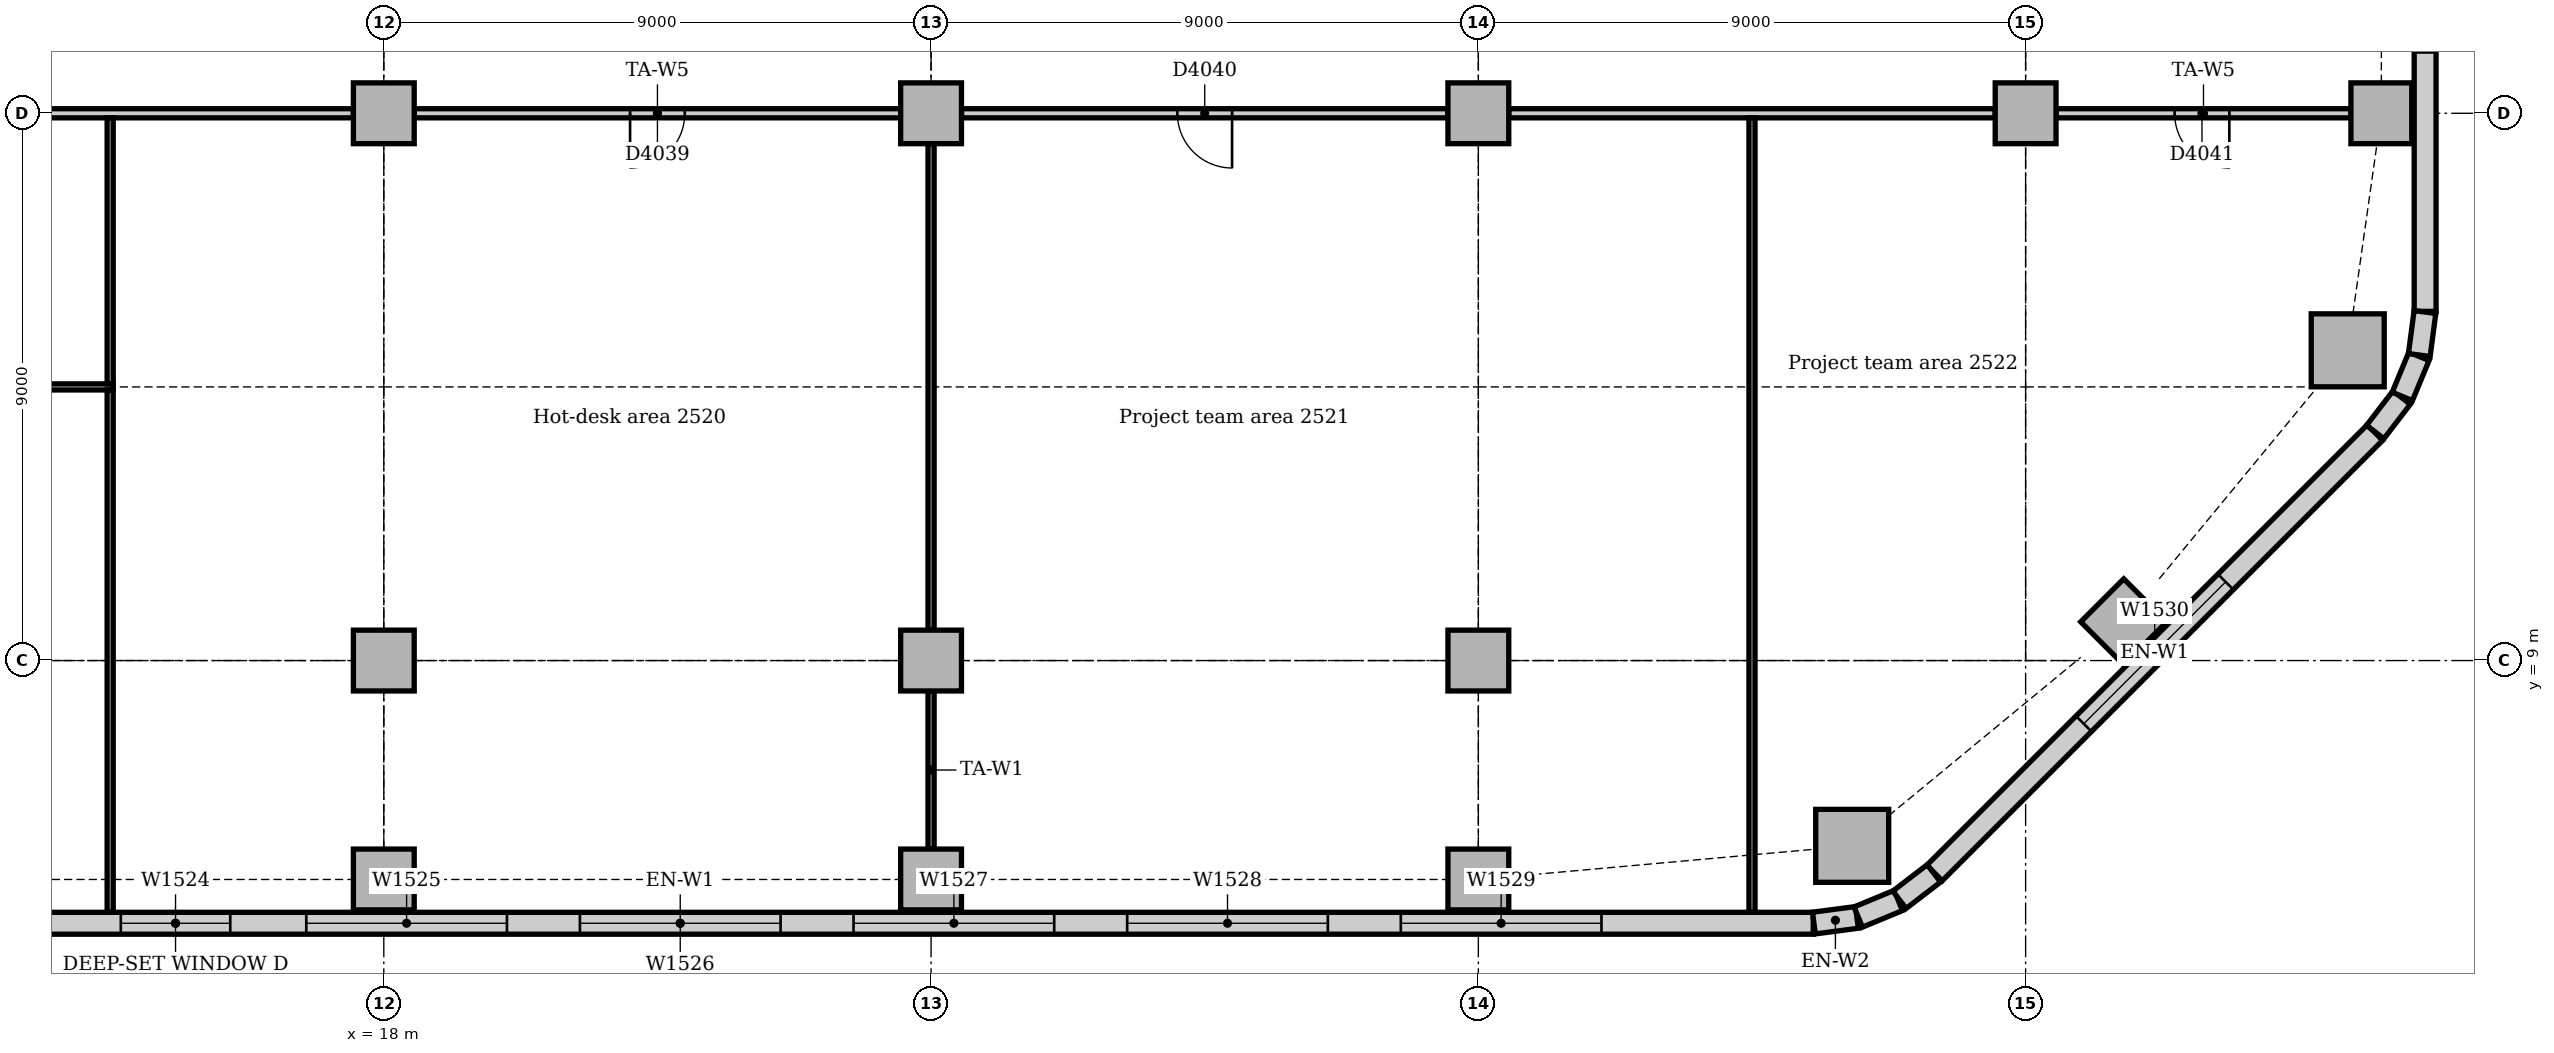
"""IFC4 building model, lengths in metres.
Left out: names, types, materials, properties, quantities, classifications, styles, units other than length and angle.
Written with IfcOpenShell. Run it as: python <this file> out.ifc"""

import sys

from ifc_helpers import new_model, si_unit, direction, frame, frame_2d, origin, origin_2d, place, context, subcontext, project, spatial, rectangle, extrude, element, fill, save


model = new_model("IFC4")
c1 = context("Model", 3, precision=1e-05, world=origin(), true_north=direction((0.0, 1.0)))
c2 = subcontext(c1, "Body", "Model", "MODEL_VIEW")
j1 = project(units=[si_unit("LENGTHUNIT", "METRE"), si_unit("PLANEANGLEUNIT", "RADIAN")], contexts=[c1])
p1 = place(None, origin())
s1 = spatial("IfcSite", under=j1, at=p1, CompositionType="ELEMENT")
p2 = place(p1, origin())
s2 = spatial("IfcBuilding", under=s1, at=p2, CompositionType="ELEMENT")
p3 = place(p2, frame((0.0, 0.0, 108.0)))
s3 = spatial("IfcBuildingStorey", under=s2, at=p3, CompositionType="ELEMENT", Elevation=108.0)
for number, where, z_axis, x_axis in (
    (1, (42.148, 5.953, 0.0), (0.0, 0.0, 1.0), (1.0, 0.0, 0.0)),
    (2, (50.297, 14.102, 0.0), (0.0, 0.0, 1.0), (1.0, 0.0, 0.0)),
):
    element("IfcColumn", number, at=place(p3, frame(where, z_axis=z_axis, x_axis=x_axis)), inside=s3, PredefinedType="COLUMN", context=c2, shape_type="SweptSolid", body=[
        extrude(rectangle(XDim=1.2, YDim=1.2, at=origin_2d()), origin(), (0.0, 0.0, 1.0), 3.85),
    ])
for number, where, z_axis, x_axis in (
    (3, (18.0, 5.4, 0.0), (0.0, 0.0, 1.0), (1.0, 0.0, 0.0)),
    (4, (27.0, 5.4, 0.0), (0.0, 0.0, 1.0), (1.0, 0.0, 0.0)),
    (5, (36.0, 5.4, 0.0), (0.0, 0.0, 1.0), (1.0, 0.0, 0.0)),
    (6, (46.614, 9.636, 0.0), (0.0, 0.0, 1.0), (0.707, 0.707, 0.0)),
    (7, (50.85, 18.0, 0.0), (0.0, 0.0, 1.0), (1.0, 0.0, 0.0)),
    (8, (18.0, 9.0, 0.0), (0.0, 0.0, 1.0), (1.0, 0.0, 0.0)),
    (9, (18.0, 18.0, 0.0), (0.0, 0.0, 1.0), (1.0, 0.0, 0.0)),
    (10, (27.0, 9.0, 0.0), (0.0, 0.0, 1.0), (1.0, 0.0, 0.0)),
    (11, (27.0, 18.0, 0.0), (0.0, 0.0, 1.0), (1.0, 0.0, 0.0)),
    (12, (36.0, 9.0, 0.0), (0.0, 0.0, 1.0), (1.0, 0.0, 0.0)),
    (13, (36.0, 18.0, 0.0), (0.0, 0.0, 1.0), (1.0, 0.0, 0.0)),
    (14, (45.0, 18.0, 0.0), (0.0, 0.0, 1.0), (1.0, 0.0, 0.0)),
):
    element("IfcColumn", number, at=place(p3, frame(where, z_axis=z_axis, x_axis=x_axis)), inside=s3, PredefinedType="COLUMN", context=c2, shape_type="SweptSolid", body=[
        extrude(rectangle(XDim=1.0, YDim=1.0, at=origin_2d()), origin(), (0.0, 0.0, 1.0), 3.85),
    ])
p4 = place(p3, frame((4.243, 4.68, 0.0), z_axis=(0.0, 0.0, 1.0), x_axis=(1.0, 0.0, 0.0)))
e15 = element("IfcWall", 15, at=p4, inside=s3, PredefinedType="STANDARD", context=c2, shape_type="SweptSolid", body=[
    extrude(rectangle(XDim=37.265, YDim=0.36, at=frame_2d((18.632, 0.0))), origin(), (0.0, 0.0, 1.0), 3.85),
])
p5 = place(p4, frame((3.482, 0.0, 0.9)))
e16 = element("IfcOpeningElement", 16, at=p5, cuts=e15, PredefinedType="OPENING", context=c2, shape_type="SweptSolid", body=[
    extrude(rectangle(XDim=3.3, YDim=1.6, at=frame_2d((1.65, 0.8))), frame((0.0, 0.19, 0.0), z_axis=(0.0, -1.0, 0.0), x_axis=(1.0, 0.0, 0.0)), (0.0, 0.0, 1.0), 0.38),
])
p6 = place(p4, frame((9.432, 0.0, 0.9)))
e17 = element("IfcOpeningElement", 17, at=p6, cuts=e15, PredefinedType="OPENING", context=c2, shape_type="SweptSolid", body=[
    extrude(rectangle(XDim=1.8, YDim=1.6, at=frame_2d((0.9, 0.8))), frame((0.0, 0.19, 0.0), z_axis=(0.0, -1.0, 0.0), x_axis=(1.0, 0.0, 0.0)), (0.0, 0.0, 1.0), 0.38),
])
p7 = place(p4, frame((12.482, 0.0, 0.9)))
e18 = element("IfcOpeningElement", 18, at=p7, cuts=e15, PredefinedType="OPENING", context=c2, shape_type="SweptSolid", body=[
    extrude(rectangle(XDim=3.3, YDim=1.6, at=frame_2d((1.65, 0.8))), frame((0.0, 0.19, 0.0), z_axis=(0.0, -1.0, 0.0), x_axis=(1.0, 0.0, 0.0)), (0.0, 0.0, 1.0), 0.38),
])
p8 = place(p4, frame((16.982, 0.0, 0.9)))
e19 = element("IfcOpeningElement", 19, at=p8, cuts=e15, PredefinedType="OPENING", context=c2, shape_type="SweptSolid", body=[
    extrude(rectangle(XDim=3.3, YDim=1.6, at=frame_2d((1.65, 0.8))), frame((0.0, 0.19, 0.0), z_axis=(0.0, -1.0, 0.0), x_axis=(1.0, 0.0, 0.0)), (0.0, 0.0, 1.0), 0.38),
])
p9 = place(p4, frame((21.482, 0.0, 0.9)))
e20 = element("IfcOpeningElement", 20, at=p9, cuts=e15, PredefinedType="OPENING", context=c2, shape_type="SweptSolid", body=[
    extrude(rectangle(XDim=3.3, YDim=1.6, at=frame_2d((1.65, 0.8))), frame((0.0, 0.19, 0.0), z_axis=(0.0, -1.0, 0.0), x_axis=(1.0, 0.0, 0.0)), (0.0, 0.0, 1.0), 0.38),
])
p10 = place(p4, frame((25.982, 0.0, 0.9)))
e21 = element("IfcOpeningElement", 21, at=p10, cuts=e15, PredefinedType="OPENING", context=c2, shape_type="SweptSolid", body=[
    extrude(rectangle(XDim=3.3, YDim=1.6, at=frame_2d((1.65, 0.8))), frame((0.0, 0.19, 0.0), z_axis=(0.0, -1.0, 0.0), x_axis=(1.0, 0.0, 0.0)), (0.0, 0.0, 1.0), 0.38),
])
p11 = place(p4, frame((30.482, 0.0, 0.9)))
e22 = element("IfcOpeningElement", 22, at=p11, cuts=e15, PredefinedType="OPENING", context=c2, shape_type="SweptSolid", body=[
    extrude(rectangle(XDim=3.3, YDim=1.6, at=frame_2d((1.65, 0.8))), frame((0.0, 0.19, 0.0), z_axis=(0.0, -1.0, 0.0), x_axis=(1.0, 0.0, 0.0)), (0.0, 0.0, 1.0), 0.38),
])
p12 = place(p3, frame((43.501, 5.506, 0.0), z_axis=(0.0, 0.0, 1.0), x_axis=(0.707106781187, 0.707106781187, 0.0)))
e23 = element("IfcWall", 23, at=p12, inside=s3, PredefinedType="STANDARD", context=c2, shape_type="SweptSolid", body=[
    extrude(rectangle(XDim=10.243, YDim=0.36, at=frame_2d((5.121, 0.0))), origin(), (0.0, 0.0, 1.0), 3.85),
])
p13 = place(p12, frame((3.471, 0.0, 0.9)))
e24 = element("IfcOpeningElement", 24, at=p13, cuts=e23, PredefinedType="OPENING", context=c2, shape_type="SweptSolid", body=[
    extrude(rectangle(XDim=3.3, YDim=1.6, at=frame_2d((1.65, 0.8))), frame((0.0, 0.19, 0.0), z_axis=(0.0, -1.0, 0.0), x_axis=(1.0, 0.0, 0.0)), (0.0, 0.0, 1.0), 0.38),
])
p14 = place(p3, frame((51.57, 14.743, 0.0), z_axis=(0.0, 0.0, 1.0), x_axis=(0.0, 1.0, 0.0)))
e25 = element("IfcWall", 25, at=p14, inside=s3, PredefinedType="STANDARD", context=c2, shape_type="SweptSolid", body=[
    extrude(rectangle(XDim=24.515, YDim=0.36, at=frame_2d((12.257, 0.0))), origin(), (0.0, 0.0, 1.0), 3.85),
])
p15 = place(p14, frame((4.257, 0.0, 0.9)))
e26 = element("IfcOpeningElement", 26, at=p15, cuts=e25, PredefinedType="OPENING", context=c2, shape_type="SweptSolid", body=[
    extrude(rectangle(XDim=1.8, YDim=1.6, at=frame_2d((0.9, 0.8))), frame((0.0, 0.19, 0.0), z_axis=(0.0, -1.0, 0.0), x_axis=(1.0, 0.0, 0.0)), (0.0, 0.0, 1.0), 0.38),
])
p16 = place(p14, frame((8.057, 0.0, 0.9)))
e27 = element("IfcOpeningElement", 27, at=p16, cuts=e25, PredefinedType="OPENING", context=c2, shape_type="SweptSolid", body=[
    extrude(rectangle(XDim=3.3, YDim=1.6, at=frame_2d((1.65, 0.8))), frame((0.0, 0.19, 0.0), z_axis=(0.0, -1.0, 0.0), x_axis=(1.0, 0.0, 0.0)), (0.0, 0.0, 1.0), 0.38),
])
p17 = place(p14, frame((12.857, 0.0, 0.9)))
e28 = element("IfcOpeningElement", 28, at=p17, cuts=e25, PredefinedType="OPENING", context=c2, shape_type="SweptSolid", body=[
    extrude(rectangle(XDim=3.3, YDim=1.6, at=frame_2d((1.65, 0.8))), frame((0.0, 0.19, 0.0), z_axis=(0.0, -1.0, 0.0), x_axis=(1.0, 0.0, 0.0)), (0.0, 0.0, 1.0), 0.38),
])
p18 = place(p14, frame((17.357, 0.0, 0.9)))
e29 = element("IfcOpeningElement", 29, at=p18, cuts=e25, PredefinedType="OPENING", context=c2, shape_type="SweptSolid", body=[
    extrude(rectangle(XDim=3.3, YDim=1.6, at=frame_2d((1.65, 0.8))), frame((0.0, 0.19, 0.0), z_axis=(0.0, -1.0, 0.0), x_axis=(1.0, 0.0, 0.0)), (0.0, 0.0, 1.0), 0.38),
])
for number, where, z_axis, x_axis in (
    (30, (41.519, 4.683, 0.0), (0.0, 0.0, 1.0), (0.991, 0.131, 0.0)),
    (31, (42.247, 4.782, 0.0), (0.0, 0.0, 1.0), (0.924, 0.383, 0.0)),
):
    element("IfcWall", number, at=place(p3, frame(where, z_axis=z_axis, x_axis=x_axis)), inside=s3, PredefinedType="STANDARD", context=c2, shape_type="SweptSolid", body=[
        extrude(rectangle(XDim=0.713, YDim=0.36, at=frame_2d((0.356, 0.0))), origin(), (0.0, 0.0, 1.0), 3.85),
    ])
for number, where, z_axis, x_axis in (
    (32, (42.925, 5.066, 0.0), (0.0, 0.0, 1.0), (0.793, 0.609, 0.0)),
    (33, (50.75, 12.759, 0.0), (0.0, 0.0, 1.0), (0.609, 0.793, 0.0)),
):
    element("IfcWall", number, at=place(p3, frame(where, z_axis=z_axis, x_axis=x_axis)), inside=s3, PredefinedType="STANDARD", context=c2, shape_type="SweptSolid", body=[
        extrude(rectangle(XDim=0.713, YDim=0.36, at=frame_2d((0.357, 0.0))), origin(), (0.0, 0.0, 1.0), 3.85),
    ])
for number, where, z_axis, x_axis in (
    (34, (51.195, 13.344, 0.0), (0.0, 0.0, 1.0), (0.383, 0.924, 0.0)),
    (35, (51.474, 14.024, 0.0), (0.0, 0.0, 1.0), (0.131, 0.991, 0.0)),
):
    element("IfcWall", number, at=place(p3, frame(where, z_axis=z_axis, x_axis=x_axis)), inside=s3, PredefinedType="STANDARD", context=c2, shape_type="SweptSolid", body=[
        extrude(rectangle(XDim=0.713, YDim=0.36, at=frame_2d((0.356, 0.0))), origin(), (0.0, 0.0, 1.0), 3.85),
    ])
p19 = place(p3, frame((45.5, 18.0, 0.0), z_axis=(0.0, 0.0, 1.0), x_axis=(1.0, 0.0, 0.0)))
e36 = element("IfcWall", 36, at=p19, inside=s3, PredefinedType="PARTITIONING", context=c2, shape_type="SweptSolid", body=[
    extrude(rectangle(XDim=4.85, YDim=0.15, at=frame_2d((2.425, 0.0))), origin(), (0.0, 0.0, 1.0), 3.254),
])
p20 = place(p19, frame((1.95, 0.0, 0.0)))
e37 = element("IfcOpeningElement", 37, at=p20, cuts=e36, PredefinedType="OPENING", context=c2, shape_type="SweptSolid", body=[
    extrude(rectangle(XDim=0.9, YDim=2.1, at=frame_2d((0.45, 1.05))), frame((0.0, 0.085, 0.0), z_axis=(0.0, -1.0, 0.0), x_axis=(1.0, 0.0, 0.0)), (0.0, 0.0, 1.0), 0.17),
])
p21 = place(p3, frame((36.5, 18.0, 0.0), z_axis=(0.0, 0.0, 1.0), x_axis=(1.0, 0.0, 0.0)))
e38 = element("IfcWall", 38, at=p21, inside=s3, PredefinedType="PARTITIONING", context=c2, shape_type="SweptSolid", body=[
    extrude(rectangle(XDim=8.0, YDim=0.15, at=frame_2d((4.0, 0.0))), origin(), (0.0, 0.0, 1.0), 3.158),
])
p22 = place(p3, frame((27.5, 18.0, 0.0), z_axis=(0.0, 0.0, 1.0), x_axis=(1.0, 0.0, 0.0)))
e39 = element("IfcWall", 39, at=p22, inside=s3, PredefinedType="PARTITIONING", context=c2, shape_type="SweptSolid", body=[
    extrude(rectangle(XDim=8.0, YDim=0.15, at=frame_2d((4.0, 0.0))), origin(), (0.0, 0.0, 1.0), 3.158),
])
p23 = place(p22, frame((3.55, 0.0, 0.0)))
e40 = element("IfcOpeningElement", 40, at=p23, cuts=e39, PredefinedType="OPENING", context=c2, shape_type="SweptSolid", body=[
    extrude(rectangle(XDim=0.9, YDim=2.1, at=frame_2d((0.45, 1.05))), frame((0.0, 0.085, 0.0), z_axis=(0.0, -1.0, 0.0), x_axis=(1.0, 0.0, 0.0)), (0.0, 0.0, 1.0), 0.17),
])
p24 = place(p3, frame((18.5, 18.0, 0.0), z_axis=(0.0, 0.0, 1.0), x_axis=(1.0, 0.0, 0.0)))
e41 = element("IfcWall", 41, at=p24, inside=s3, PredefinedType="PARTITIONING", context=c2, shape_type="SweptSolid", body=[
    extrude(rectangle(XDim=8.0, YDim=0.15, at=frame_2d((4.0, 0.0))), origin(), (0.0, 0.0, 1.0), 3.158),
])
p25 = place(p24, frame((3.55, 0.0, 0.0)))
e42 = element("IfcOpeningElement", 42, at=p25, cuts=e41, PredefinedType="OPENING", context=c2, shape_type="SweptSolid", body=[
    extrude(rectangle(XDim=0.9, YDim=2.1, at=frame_2d((0.45, 1.05))), frame((0.0, 0.085, 0.0), z_axis=(0.0, -1.0, 0.0), x_axis=(1.0, 0.0, 0.0)), (0.0, 0.0, 1.0), 0.17),
])
p26 = place(p3, frame((9.5, 18.0, 0.0), z_axis=(0.0, 0.0, 1.0), x_axis=(1.0, 0.0, 0.0)))
e43 = element("IfcWall", 43, at=p26, inside=s3, PredefinedType="PARTITIONING", context=c2, shape_type="SweptSolid", body=[
    extrude(rectangle(XDim=8.0, YDim=0.15, at=frame_2d((4.0, 0.0))), origin(), (0.0, 0.0, 1.0), 3.158),
])
p27 = place(p3, frame((0.36, 13.5, 0.0), z_axis=(0.0, 0.0, 1.0), x_axis=(1.0, 0.0, 0.0)))
e44 = element("IfcWall", 44, at=p27, inside=s3, PredefinedType="PARTITIONING", context=c2, shape_type="SweptSolid", body=[
    extrude(rectangle(XDim=13.19, YDim=0.1, at=frame_2d((6.595, 0.0))), origin(), (0.0, 0.0, 1.0), 3.354),
])
p28 = place(p27, frame((6.15, 0.0, 0.0)))
e45 = element("IfcOpeningElement", 45, at=p28, cuts=e44, PredefinedType="OPENING", context=c2, shape_type="SweptSolid", body=[
    extrude(rectangle(XDim=0.9, YDim=2.1, at=frame_2d((0.45, 1.05))), frame((0.0, 0.06, 0.0), z_axis=(0.0, -1.0, 0.0), x_axis=(1.0, 0.0, 0.0)), (0.0, 0.0, 1.0), 0.12),
])
p29 = place(p3, frame((13.5, 13.55, 0.0), z_axis=(0.0, 0.0, 1.0), x_axis=(0.0, 1.0, 0.0)))
e46 = element("IfcWall", 46, at=p29, inside=s3, PredefinedType="PARTITIONING", context=c2, shape_type="SweptSolid", body=[
    extrude(rectangle(XDim=4.375, YDim=0.1, at=frame_2d((2.188, 0.0))), origin(), (0.0, 0.0, 1.0), 3.85),
])
p30 = place(p3, frame((13.5, 4.86, 0.0), z_axis=(0.0, 0.0, 1.0), x_axis=(0.0, 1.0, 0.0)))
e47 = element("IfcWall", 47, at=p30, inside=s3, PredefinedType="PARTITIONING", context=c2, shape_type="SweptSolid", body=[
    extrude(rectangle(XDim=8.59, YDim=0.1, at=frame_2d((4.295, 0.0))), origin(), (0.0, 0.0, 1.0), 3.85),
])
p31 = place(p3, frame((27.0, 5.9, 0.0), z_axis=(0.0, 0.0, 1.0), x_axis=(0.0, 1.0, 0.0)))
e48 = element("IfcWall", 48, at=p31, inside=s3, PredefinedType="PARTITIONING", context=c2, shape_type="SweptSolid", body=[
    extrude(rectangle(XDim=2.6, YDim=0.1, at=frame_2d((1.3, 0.0))), origin(), (0.0, 0.0, 1.0), 3.652),
])
p32 = place(p3, frame((27.0, 9.5, 0.0), z_axis=(0.0, 0.0, 1.0), x_axis=(0.0, 1.0, 0.0)))
e49 = element("IfcWall", 49, at=p32, inside=s3, PredefinedType="PARTITIONING", context=c2, shape_type="SweptSolid", body=[
    extrude(rectangle(XDim=8.0, YDim=0.1, at=frame_2d((4.0, 0.0))), origin(), (0.0, 0.0, 1.0), 3.256),
])
p33 = place(p3, frame((40.5, 4.86, 0.0), z_axis=(0.0, 0.0, 1.0), x_axis=(0.0, 1.0, 0.0)))
e50 = element("IfcWall", 50, at=p33, inside=s3, PredefinedType="PARTITIONING", context=c2, shape_type="SweptSolid", body=[
    extrude(rectangle(XDim=13.065, YDim=0.1, at=frame_2d((6.532, 0.0))), origin(), (0.0, 0.0, 1.0), 3.85),
])
p34 = place(p6, origin())
e51 = element("IfcWindow", 51, at=p34, inside=s3, PartitioningType="SINGLE_PANEL", PredefinedType="WINDOW", context=c2, shape_type="SweptSolid", body=[
    extrude(rectangle(XDim=1.8, YDim=1.6, at=frame_2d((0.9, 0.8))), frame((0.0, 0.13, 0.0), z_axis=(0.0, -1.0, 0.0), x_axis=(1.0, 0.0, 0.0)), (0.0, 0.0, 1.0), 0.06),
])
fill(e17, e51)
p35 = place(p7, origin())
e52 = element("IfcWindow", 52, at=p35, inside=s3, PartitioningType="SINGLE_PANEL", PredefinedType="WINDOW", context=c2, shape_type="SweptSolid", body=[
    extrude(rectangle(XDim=3.3, YDim=1.6, at=frame_2d((1.65, 0.8))), frame((0.0, 0.13, 0.0), z_axis=(0.0, -1.0, 0.0), x_axis=(1.0, 0.0, 0.0)), (0.0, 0.0, 1.0), 0.06),
])
fill(e18, e52)
p36 = place(p8, origin())
e53 = element("IfcWindow", 53, at=p36, inside=s3, PartitioningType="SINGLE_PANEL", PredefinedType="WINDOW", context=c2, shape_type="SweptSolid", body=[
    extrude(rectangle(XDim=3.3, YDim=1.6, at=frame_2d((1.65, 0.8))), frame((0.0, 0.13, 0.0), z_axis=(0.0, -1.0, 0.0), x_axis=(1.0, 0.0, 0.0)), (0.0, 0.0, 1.0), 0.06),
])
fill(e19, e53)
p37 = place(p9, origin())
e54 = element("IfcWindow", 54, at=p37, inside=s3, PartitioningType="SINGLE_PANEL", PredefinedType="WINDOW", context=c2, shape_type="SweptSolid", body=[
    extrude(rectangle(XDim=3.3, YDim=1.6, at=frame_2d((1.65, 0.8))), frame((0.0, 0.13, 0.0), z_axis=(0.0, -1.0, 0.0), x_axis=(1.0, 0.0, 0.0)), (0.0, 0.0, 1.0), 0.06),
])
fill(e20, e54)
p38 = place(p10, origin())
e55 = element("IfcWindow", 55, at=p38, inside=s3, PartitioningType="SINGLE_PANEL", PredefinedType="WINDOW", context=c2, shape_type="SweptSolid", body=[
    extrude(rectangle(XDim=3.3, YDim=1.6, at=frame_2d((1.65, 0.8))), frame((0.0, 0.13, 0.0), z_axis=(0.0, -1.0, 0.0), x_axis=(1.0, 0.0, 0.0)), (0.0, 0.0, 1.0), 0.06),
])
fill(e21, e55)
p39 = place(p11, origin())
e56 = element("IfcWindow", 56, at=p39, inside=s3, PartitioningType="SINGLE_PANEL", PredefinedType="WINDOW", context=c2, shape_type="SweptSolid", body=[
    extrude(rectangle(XDim=3.3, YDim=1.6, at=frame_2d((1.65, 0.8))), frame((0.0, 0.13, 0.0), z_axis=(0.0, -1.0, 0.0), x_axis=(1.0, 0.0, 0.0)), (0.0, 0.0, 1.0), 0.06),
])
fill(e22, e56)
p40 = place(p13, origin())
e57 = element("IfcWindow", 57, at=p40, inside=s3, PartitioningType="SINGLE_PANEL", PredefinedType="WINDOW", context=c2, shape_type="SweptSolid", body=[
    extrude(rectangle(XDim=3.3, YDim=1.6, at=frame_2d((1.65, 0.8))), frame((0.0, 0.13, 0.0), z_axis=(0.0, -1.0, 0.0), x_axis=(1.0, 0.0, 0.0)), (0.0, 0.0, 1.0), 0.06),
])
fill(e24, e57)
p41 = place(p25, frame((0.9, 0.0, 0.0), z_axis=(0.0, 0.0, 1.0), x_axis=(-1.0, 0.0, 0.0)))
e58 = element("IfcDoor", 58, at=p41, inside=s3, OperationType="SINGLE_SWING_RIGHT", PredefinedType="DOOR", context=c2, shape_type="SweptSolid", body=[
    extrude(rectangle(XDim=0.9, YDim=2.1, at=frame_2d((0.45, 1.05))), frame((0.0, 0.025, 0.0), z_axis=(0.0, -1.0, 0.0), x_axis=(1.0, 0.0, 0.0)), (0.0, 0.0, 1.0), 0.05),
])
fill(e42, e58)
p42 = place(p23, frame((0.9, 0.0, 0.0), z_axis=(0.0, 0.0, 1.0), x_axis=(-1.0, 0.0, 0.0)))
e59 = element("IfcDoor", 59, at=p42, inside=s3, OperationType="SINGLE_SWING_LEFT", PredefinedType="DOOR", context=c2, shape_type="SweptSolid", body=[
    extrude(rectangle(XDim=0.9, YDim=2.1, at=frame_2d((0.45, 1.05))), frame((0.0, 0.025, 0.0), z_axis=(0.0, -1.0, 0.0), x_axis=(1.0, 0.0, 0.0)), (0.0, 0.0, 1.0), 0.05),
])
fill(e40, e59)
p43 = place(p20, frame((0.9, 0.0, 0.0), z_axis=(0.0, 0.0, 1.0), x_axis=(-1.0, 0.0, 0.0)))
e60 = element("IfcDoor", 60, at=p43, inside=s3, OperationType="SINGLE_SWING_LEFT", PredefinedType="DOOR", context=c2, shape_type="SweptSolid", body=[
    extrude(rectangle(XDim=0.9, YDim=2.1, at=frame_2d((0.45, 1.05))), frame((0.0, 0.025, 0.0), z_axis=(0.0, -1.0, 0.0), x_axis=(1.0, 0.0, 0.0)), (0.0, 0.0, 1.0), 0.05),
])
fill(e37, e60)
save(model, sys.argv[1])
